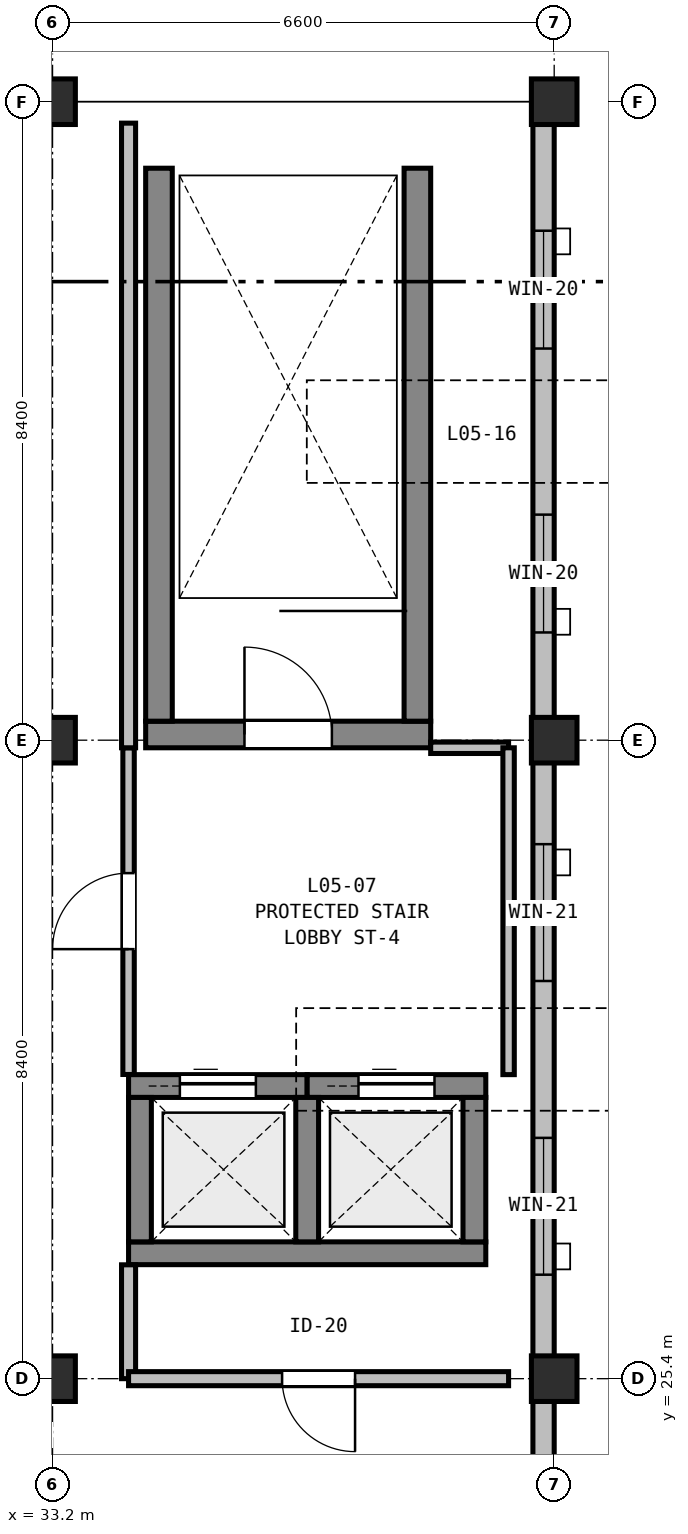
"""IFC4 building model, lengths in metres.
Left out: names, types, materials, properties, quantities, classifications, styles, units other than length and angle.
Written with IfcOpenShell. Run it as: python <this file> out.ifc"""

import sys

from ifc_helpers import new_model, si_unit, direction, frame, frame_2d, origin, origin_2d, place, context, subcontext, project, spatial, rectangle, extrude, element, fill, save


model = new_model("IFC4")
c1 = context("Model", 3, precision=1e-05, world=origin(), true_north=direction((0.0, 1.0)))
c2 = subcontext(c1, "Body", "Model", "MODEL_VIEW")
j1 = project(units=[si_unit("LENGTHUNIT", "METRE"), si_unit("PLANEANGLEUNIT", "RADIAN")], contexts=[c1])
p1 = place(None, origin())
s1 = spatial("IfcSite", under=j1, at=p1, CompositionType="ELEMENT")
p2 = place(p1, origin())
s2 = spatial("IfcBuilding", under=s1, at=p2, CompositionType="ELEMENT")
p3 = place(p2, frame((0.0, 0.0, 24.0)))
s3 = spatial("IfcBuildingStorey", under=s2, at=p3, CompositionType="ELEMENT", Elevation=24.0)
for number, where, z_axis, x_axis in (
    (1, (33.2, 25.4, 0.0), (0.0, 0.0, 1.0), (1.0, 0.0, 0.0)),
    (2, (33.2, 33.8, 0.0), (0.0, 0.0, 1.0), (1.0, 0.0, 0.0)),
    (3, (33.2, 42.2, 0.0), (0.0, 0.0, 1.0), (1.0, 0.0, 0.0)),
    (4, (39.8, 25.4, 0.0), (0.0, 0.0, 1.0), (1.0, 0.0, 0.0)),
    (5, (39.8, 33.8, 0.0), (0.0, 0.0, 1.0), (1.0, 0.0, 0.0)),
    (6, (39.8, 42.2, 0.0), (0.0, 0.0, 1.0), (1.0, 0.0, 0.0)),
):
    element("IfcColumn", number, at=place(p3, frame(where, z_axis=z_axis, x_axis=x_axis)), inside=s3, PredefinedType="COLUMN", context=c2, shape_type="SweptSolid", body=[
        extrude(rectangle(XDim=0.6, YDim=0.6, at=origin_2d()), origin(), (0.0, 0.0, 1.0), 4.44),
    ])
p4 = place(p3, frame((34.425, 33.875, 0.0), z_axis=(0.0, 0.0, 1.0), x_axis=(1.0, 0.0, 0.0)))
e7 = element("IfcWall", 7, at=p4, inside=s3, PredefinedType="SHEAR", context=c2, shape_type="SweptSolid", body=[
    extrude(rectangle(XDim=3.75, YDim=0.35, at=frame_2d((1.875, 0.0))), origin(), (0.0, 0.0, 1.0), 4.44),
])
p5 = place(p4, frame((1.3, 0.0, 0.0)))
e8 = element("IfcOpeningElement", 8, at=p5, cuts=e7, PredefinedType="OPENING", context=c2, shape_type="SweptSolid", body=[
    extrude(rectangle(XDim=1.15, YDim=2.15, at=frame_2d((0.575, 1.075))), frame((0.0, 0.185, 0.0), z_axis=(0.0, -1.0, 0.0), x_axis=(1.0, 0.0, 0.0)), (0.0, 0.0, 1.0), 0.37),
])
p6 = place(p3, frame((34.425, 41.5, 0.0), z_axis=(0.0, 0.0, 1.0), x_axis=(1.0, 0.0, 0.0)))
e9 = element("IfcWall", 9, at=p6, inside=s3, PredefinedType="SHEAR", context=c2, shape_type="SweptSolid", body=[
    extrude(rectangle(XDim=3.75, YDim=0.35, at=frame_2d((1.875, 0.0))), origin(), (0.0, 0.0, 1.0), 4.44),
])
for number, where, z_axis, x_axis in (
    (10, (34.6, 34.05, 0.0), (0.0, 0.0, 1.0), (0.0, 1.0, 0.0)),
    (11, (38.0, 34.05, 0.0), (0.0, 0.0, 1.0), (0.0, 1.0, 0.0)),
):
    element("IfcWall", number, at=place(p3, frame(where, z_axis=z_axis, x_axis=x_axis)), inside=s3, PredefinedType="SHEAR", context=c2, shape_type="SweptSolid", body=[
        extrude(rectangle(XDim=7.275, YDim=0.35, at=frame_2d((3.637, 0.0))), origin(), (0.0, 0.0, 1.0), 4.44),
    ])
p7 = place(p3, frame((34.2, 27.05, 0.0), z_axis=(0.0, 0.0, 1.0), x_axis=(1.0, 0.0, 0.0)))
e12 = element("IfcWall", 12, at=p7, inside=s3, PredefinedType="SHEAR", context=c2, shape_type="SweptSolid", body=[
    extrude(rectangle(XDim=4.7, YDim=0.3, at=frame_2d((2.35, 0.0))), origin(), (0.0, 0.0, 1.0), 4.44),
])
p8 = place(p3, frame((34.2, 29.25, 0.0), z_axis=(0.0, 0.0, 1.0), x_axis=(1.0, 0.0, 0.0)))
e13 = element("IfcWall", 13, at=p8, inside=s3, PredefinedType="SHEAR", context=c2, shape_type="SweptSolid", body=[
    extrude(rectangle(XDim=2.35, YDim=0.3, at=frame_2d((1.175, 0.0))), origin(), (0.0, 0.0, 1.0), 4.44),
])
p9 = place(p8, frame((0.675, 0.0, 0.0)))
e14 = element("IfcOpeningElement", 14, at=p9, cuts=e13, PredefinedType="OPENING", context=c2, shape_type="SweptSolid", body=[
    extrude(rectangle(XDim=1.0, YDim=2.1, at=frame_2d((0.5, 1.05))), frame((0.0, 0.16, 0.0), z_axis=(0.0, -1.0, 0.0), x_axis=(1.0, 0.0, 0.0)), (0.0, 0.0, 1.0), 0.32),
])
p10 = place(p3, frame((36.55, 29.25, 0.0), z_axis=(0.0, 0.0, 1.0), x_axis=(1.0, 0.0, 0.0)))
e15 = element("IfcWall", 15, at=p10, inside=s3, PredefinedType="SHEAR", context=c2, shape_type="SweptSolid", body=[
    extrude(rectangle(XDim=2.35, YDim=0.3, at=frame_2d((1.175, 0.0))), origin(), (0.0, 0.0, 1.0), 4.44),
])
p11 = place(p10, frame((0.675, 0.0, 0.0)))
e16 = element("IfcOpeningElement", 16, at=p11, cuts=e15, PredefinedType="OPENING", context=c2, shape_type="SweptSolid", body=[
    extrude(rectangle(XDim=1.0, YDim=2.1, at=frame_2d((0.5, 1.05))), frame((0.0, 0.16, 0.0), z_axis=(0.0, -1.0, 0.0), x_axis=(1.0, 0.0, 0.0)), (0.0, 0.0, 1.0), 0.32),
])
for number, where, z_axis, x_axis in (
    (17, (34.35, 27.2, 0.0), (0.0, 0.0, 1.0), (0.0, 1.0, 0.0)),
    (18, (36.55, 27.2, 0.0), (0.0, 0.0, 1.0), (0.0, 1.0, 0.0)),
    (19, (38.75, 27.2, 0.0), (0.0, 0.0, 1.0), (0.0, 1.0, 0.0)),
):
    element("IfcWall", number, at=place(p3, frame(where, z_axis=z_axis, x_axis=x_axis)), inside=s3, PredefinedType="SHEAR", context=c2, shape_type="SweptSolid", body=[
        extrude(rectangle(XDim=1.9, YDim=0.3, at=frame_2d((0.95, 0.0))), origin(), (0.0, 0.0, 1.0), 4.44),
    ])
p12 = place(p3, frame((33.2, 42.06, 0.0), z_axis=(0.0, 0.0, 1.0), x_axis=(1.0, 0.0, 0.0)))
e20 = element("IfcWall", 20, at=p12, inside=s3, PredefinedType="STANDARD", context=c2, shape_type="SweptSolid", body=[
    extrude(rectangle(XDim=6.6, YDim=0.28, at=frame_2d((3.3, 0.0))), origin(), (0.0, 0.0, 1.0), 3.735),
])
p13 = place(p12, frame((1.24, 0.0, 0.75)))
e21 = element("IfcOpeningElement", 21, at=p13, cuts=e20, PredefinedType="OPENING", context=c2, shape_type="SweptSolid", body=[
    extrude(rectangle(XDim=1.3, YDim=2.4, at=frame_2d((0.65, 1.2))), frame((0.0, 0.15, 0.0), z_axis=(0.0, -1.0, 0.0), x_axis=(1.0, 0.0, 0.0)), (0.0, 0.0, 1.0), 0.3),
])
p14 = place(p12, frame((4.168, 0.0, 0.75)))
e22 = element("IfcOpeningElement", 22, at=p14, cuts=e20, PredefinedType="OPENING", context=c2, shape_type="SweptSolid", body=[
    extrude(rectangle(XDim=1.3, YDim=2.4, at=frame_2d((0.65, 1.2))), frame((0.0, 0.15, 0.0), z_axis=(0.0, -1.0, 0.0), x_axis=(1.0, 0.0, 0.0)), (0.0, 0.0, 1.0), 0.3),
])
p15 = place(p3, frame((39.66, 41.92, 0.0), z_axis=(0.0, 0.0, 1.0), x_axis=(0.0, -1.0, 0.0)))
e23 = element("IfcWall", 23, at=p15, inside=s3, PredefinedType="STANDARD", context=c2, shape_type="SweptSolid", body=[
    extrude(rectangle(XDim=8.12, YDim=0.28, at=frame_2d((4.06, 0.0))), origin(), (0.0, 0.0, 1.0), 3.885),
])
p16 = place(p15, frame((1.417, 0.0, 0.75)))
e24 = element("IfcOpeningElement", 24, at=p16, cuts=e23, PredefinedType="OPENING", context=c2, shape_type="SweptSolid", body=[
    extrude(rectangle(XDim=1.55, YDim=2.4, at=frame_2d((0.775, 1.2))), frame((0.0, 0.15, 0.0), z_axis=(0.0, -1.0, 0.0), x_axis=(1.0, 0.0, 0.0)), (0.0, 0.0, 1.0), 0.3),
])
p17 = place(p15, frame((5.153, 0.0, 0.75)))
e25 = element("IfcOpeningElement", 25, at=p17, cuts=e23, PredefinedType="OPENING", context=c2, shape_type="SweptSolid", body=[
    extrude(rectangle(XDim=1.55, YDim=2.4, at=frame_2d((0.775, 1.2))), frame((0.0, 0.15, 0.0), z_axis=(0.0, -1.0, 0.0), x_axis=(1.0, 0.0, 0.0)), (0.0, 0.0, 1.0), 0.3),
])
p18 = place(p3, frame((39.66, 33.8, 0.0), z_axis=(0.0, 0.0, 1.0), x_axis=(0.0, -1.0, 0.0)))
e26 = element("IfcWall", 26, at=p18, inside=s3, PredefinedType="STANDARD", context=c2, shape_type="SweptSolid", body=[
    extrude(rectangle(XDim=8.4, YDim=0.28, at=frame_2d((4.2, 0.0))), origin(), (0.0, 0.0, 1.0), 3.885),
])
p19 = place(p18, frame((1.368, 0.0, 0.75)))
e27 = element("IfcOpeningElement", 27, at=p19, cuts=e26, PredefinedType="OPENING", context=c2, shape_type="SweptSolid", body=[
    extrude(rectangle(XDim=1.8, YDim=2.4, at=frame_2d((0.9, 1.2))), frame((0.0, 0.15, 0.0), z_axis=(0.0, -1.0, 0.0), x_axis=(1.0, 0.0, 0.0)), (0.0, 0.0, 1.0), 0.3),
])
p20 = place(p18, frame((5.232, 0.0, 0.75)))
e28 = element("IfcOpeningElement", 28, at=p20, cuts=e26, PredefinedType="OPENING", context=c2, shape_type="SweptSolid", body=[
    extrude(rectangle(XDim=1.8, YDim=2.4, at=frame_2d((0.9, 1.2))), frame((0.0, 0.15, 0.0), z_axis=(0.0, -1.0, 0.0), x_axis=(1.0, 0.0, 0.0)), (0.0, 0.0, 1.0), 0.3),
])
p21 = place(p3, frame((39.66, 25.4, 0.0), z_axis=(0.0, 0.0, 1.0), x_axis=(0.0, -1.0, 0.0)))
e29 = element("IfcWall", 29, at=p21, inside=s3, PredefinedType="STANDARD", context=c2, shape_type="SweptSolid", body=[
    extrude(rectangle(XDim=8.12, YDim=0.28, at=frame_2d((4.06, 0.0))), origin(), (0.0, 0.0, 1.0), 3.885),
])
p22 = place(p21, frame((2.64, 0.0, 0.75)))
e30 = element("IfcOpeningElement", 30, at=p22, cuts=e29, PredefinedType="OPENING", context=c2, shape_type="SweptSolid", body=[
    extrude(rectangle(XDim=2.15, YDim=2.4, at=frame_2d((1.075, 1.2))), frame((0.0, 0.15, 0.0), z_axis=(0.0, -1.0, 0.0), x_axis=(1.0, 0.0, 0.0)), (0.0, 0.0, 1.0), 0.3),
])
p23 = place(p3, frame((38.175, 33.7, 0.0), z_axis=(0.0, 0.0, 1.0), x_axis=(1.0, 0.0, 0.0)))
e31 = element("IfcWall", 31, at=p23, inside=s3, PredefinedType="PARTITIONING", context=c2, shape_type="SweptSolid", body=[
    extrude(rectangle(XDim=1.025, YDim=0.15, at=frame_2d((0.512, 0.0))), origin(), (0.0, 0.0, 1.0), 3.885),
])
p24 = place(p3, frame((39.2, 33.7, 0.0), z_axis=(0.0, 0.0, 1.0), x_axis=(0.0, -1.0, 0.0)))
e32 = element("IfcWall", 32, at=p24, inside=s3, PredefinedType="PARTITIONING", context=c2, shape_type="SweptSolid", body=[
    extrude(rectangle(XDim=4.3, YDim=0.15, at=frame_2d((2.15, 0.0))), origin(), (0.0, 0.0, 1.0), 3.885),
])
p25 = place(p3, frame((34.2, 29.402, 0.0), z_axis=(0.0, 0.0, 1.0), x_axis=(0.0, 1.0, 0.0)))
e33 = element("IfcWall", 33, at=p25, inside=s3, PredefinedType="PARTITIONING", context=c2, shape_type="SweptSolid", body=[
    extrude(rectangle(XDim=4.298, YDim=0.15, at=frame_2d((2.149, 0.0))), origin(), (0.0, 0.0, 1.0), 3.885),
])
p26 = place(p25, frame((1.649, 0.0, 0.0)))
e34 = element("IfcOpeningElement", 34, at=p26, cuts=e33, PredefinedType="OPENING", context=c2, shape_type="SweptSolid", body=[
    extrude(rectangle(XDim=1.0, YDim=2.1, at=frame_2d((0.5, 1.05))), frame((0.0, 0.085, 0.0), z_axis=(0.0, -1.0, 0.0), x_axis=(1.0, 0.0, 0.0)), (0.0, 0.0, 1.0), 0.17),
])
p27 = place(p3, frame((34.2, 25.4, 0.0), z_axis=(0.0, 0.0, 1.0), x_axis=(0.0, 1.0, 0.0)))
e35 = element("IfcWall", 35, at=p27, inside=s3, PredefinedType="PARTITIONING", context=c2, shape_type="SweptSolid", body=[
    extrude(rectangle(XDim=1.498, YDim=0.185, at=frame_2d((0.749, 0.0))), origin(), (0.0, 0.0, 1.0), 3.885),
])
p28 = place(p3, frame((34.2, 33.7, 0.0), z_axis=(0.0, 0.0, 1.0), x_axis=(0.0, 1.0, 0.0)))
e36 = element("IfcWall", 36, at=p28, inside=s3, PredefinedType="PARTITIONING", context=c2, shape_type="SweptSolid", body=[
    extrude(rectangle(XDim=8.218, YDim=0.185, at=frame_2d((4.109, 0.0))), origin(), (0.0, 0.0, 1.0), 3.885),
])
p29 = place(p3, frame((39.2, 25.4, 0.0), z_axis=(0.0, 0.0, 1.0), x_axis=(-1.0, 0.0, 0.0)))
e37 = element("IfcWall", 37, at=p29, inside=s3, PredefinedType="PARTITIONING", context=c2, shape_type="SweptSolid", body=[
    extrude(rectangle(XDim=5.0, YDim=0.185, at=frame_2d((2.5, 0.0))), origin(), (0.0, 0.0, 1.0), 3.885),
])
p30 = place(p29, frame((2.02, 0.0, 0.0)))
e38 = element("IfcOpeningElement", 38, at=p30, cuts=e37, PredefinedType="OPENING", context=c2, shape_type="SweptSolid", body=[
    extrude(rectangle(XDim=0.96, YDim=2.14, at=frame_2d((0.48, 1.07))), frame((0.0, 0.103, 0.0), z_axis=(0.0, -1.0, 0.0), x_axis=(1.0, 0.0, 0.0)), (0.0, 0.0, 1.0), 0.205),
])
p31 = place(p13, origin())
e39 = element("IfcWindow", 39, at=p31, inside=s3, PartitioningType="SINGLE_PANEL", PredefinedType="WINDOW", context=c2, shape_type="SweptSolid", body=[
    extrude(rectangle(XDim=1.3, YDim=2.4, at=frame_2d((0.65, 1.2))), frame((0.0, 0.03, 0.0), z_axis=(0.0, -1.0, 0.0), x_axis=(1.0, 0.0, 0.0)), (0.0, 0.0, 1.0), 0.06),
])
fill(e21, e39)
p32 = place(p14, origin())
e40 = element("IfcWindow", 40, at=p32, inside=s3, PartitioningType="SINGLE_PANEL", PredefinedType="WINDOW", context=c2, shape_type="SweptSolid", body=[
    extrude(rectangle(XDim=1.3, YDim=2.4, at=frame_2d((0.65, 1.2))), frame((0.0, 0.03, 0.0), z_axis=(0.0, -1.0, 0.0), x_axis=(1.0, 0.0, 0.0)), (0.0, 0.0, 1.0), 0.06),
])
fill(e22, e40)
p33 = place(p16, origin())
e41 = element("IfcWindow", 41, at=p33, inside=s3, PartitioningType="SINGLE_PANEL", PredefinedType="WINDOW", context=c2, shape_type="SweptSolid", body=[
    extrude(rectangle(XDim=1.55, YDim=2.4, at=frame_2d((0.775, 1.2))), frame((0.0, 0.03, 0.0), z_axis=(0.0, -1.0, 0.0), x_axis=(1.0, 0.0, 0.0)), (0.0, 0.0, 1.0), 0.06),
])
fill(e24, e41)
p34 = place(p17, origin())
e42 = element("IfcWindow", 42, at=p34, inside=s3, PartitioningType="SINGLE_PANEL", PredefinedType="WINDOW", context=c2, shape_type="SweptSolid", body=[
    extrude(rectangle(XDim=1.55, YDim=2.4, at=frame_2d((0.775, 1.2))), frame((0.0, 0.03, 0.0), z_axis=(0.0, -1.0, 0.0), x_axis=(1.0, 0.0, 0.0)), (0.0, 0.0, 1.0), 0.06),
])
fill(e25, e42)
p35 = place(p19, origin())
e43 = element("IfcWindow", 43, at=p35, inside=s3, PartitioningType="SINGLE_PANEL", PredefinedType="WINDOW", context=c2, shape_type="SweptSolid", body=[
    extrude(rectangle(XDim=1.8, YDim=2.4, at=frame_2d((0.9, 1.2))), frame((0.0, 0.03, 0.0), z_axis=(0.0, -1.0, 0.0), x_axis=(1.0, 0.0, 0.0)), (0.0, 0.0, 1.0), 0.06),
])
fill(e27, e43)
p36 = place(p20, origin())
e44 = element("IfcWindow", 44, at=p36, inside=s3, PartitioningType="SINGLE_PANEL", PredefinedType="WINDOW", context=c2, shape_type="SweptSolid", body=[
    extrude(rectangle(XDim=1.8, YDim=2.4, at=frame_2d((0.9, 1.2))), frame((0.0, 0.03, 0.0), z_axis=(0.0, -1.0, 0.0), x_axis=(1.0, 0.0, 0.0)), (0.0, 0.0, 1.0), 0.06),
])
fill(e28, e44)
p37 = place(p5, origin())
e45 = element("IfcDoor", 45, at=p37, inside=s3, OperationType="SINGLE_SWING_LEFT", PredefinedType="DOOR", context=c2, shape_type="SweptSolid", body=[
    extrude(rectangle(XDim=1.15, YDim=2.15, at=frame_2d((0.575, 1.075))), frame((0.0, 0.025, 0.0), z_axis=(0.0, -1.0, 0.0), x_axis=(1.0, 0.0, 0.0)), (0.0, 0.0, 1.0), 0.05),
])
fill(e8, e45)
p38 = place(p9, origin())
e46 = element("IfcDoor", 46, at=p38, inside=s3, OperationType="SLIDING_TO_LEFT", PredefinedType="DOOR", context=c2, shape_type="SweptSolid", body=[
    extrude(rectangle(XDim=1.0, YDim=2.1, at=frame_2d((0.5, 1.05))), frame((0.0, 0.025, 0.0), z_axis=(0.0, -1.0, 0.0), x_axis=(1.0, 0.0, 0.0)), (0.0, 0.0, 1.0), 0.05),
])
fill(e14, e46)
p39 = place(p11, origin())
e47 = element("IfcDoor", 47, at=p39, inside=s3, OperationType="SLIDING_TO_LEFT", PredefinedType="DOOR", context=c2, shape_type="SweptSolid", body=[
    extrude(rectangle(XDim=1.0, YDim=2.1, at=frame_2d((0.5, 1.05))), frame((0.0, 0.025, 0.0), z_axis=(0.0, -1.0, 0.0), x_axis=(1.0, 0.0, 0.0)), (0.0, 0.0, 1.0), 0.05),
])
fill(e16, e47)
p40 = place(p26, origin())
e48 = element("IfcDoor", 48, at=p40, inside=s3, OperationType="SINGLE_SWING_LEFT", PredefinedType="DOOR", context=c2, shape_type="SweptSolid", body=[
    extrude(rectangle(XDim=1.0, YDim=2.1, at=frame_2d((0.5, 1.05))), frame((0.0, 0.025, 0.0), z_axis=(0.0, -1.0, 0.0), x_axis=(1.0, 0.0, 0.0)), (0.0, 0.0, 1.0), 0.05),
])
fill(e34, e48)
p41 = place(p30, origin())
e49 = element("IfcDoor", 49, at=p41, inside=s3, OperationType="SINGLE_SWING_LEFT", PredefinedType="DOOR", context=c2, shape_type="SweptSolid", body=[
    extrude(rectangle(XDim=0.96, YDim=2.14, at=frame_2d((0.48, 1.07))), frame((0.0, 0.025, 0.0), z_axis=(0.0, -1.0, 0.0), x_axis=(1.0, 0.0, 0.0)), (0.0, 0.0, 1.0), 0.05),
])
fill(e38, e49)
save(model, sys.argv[1])
